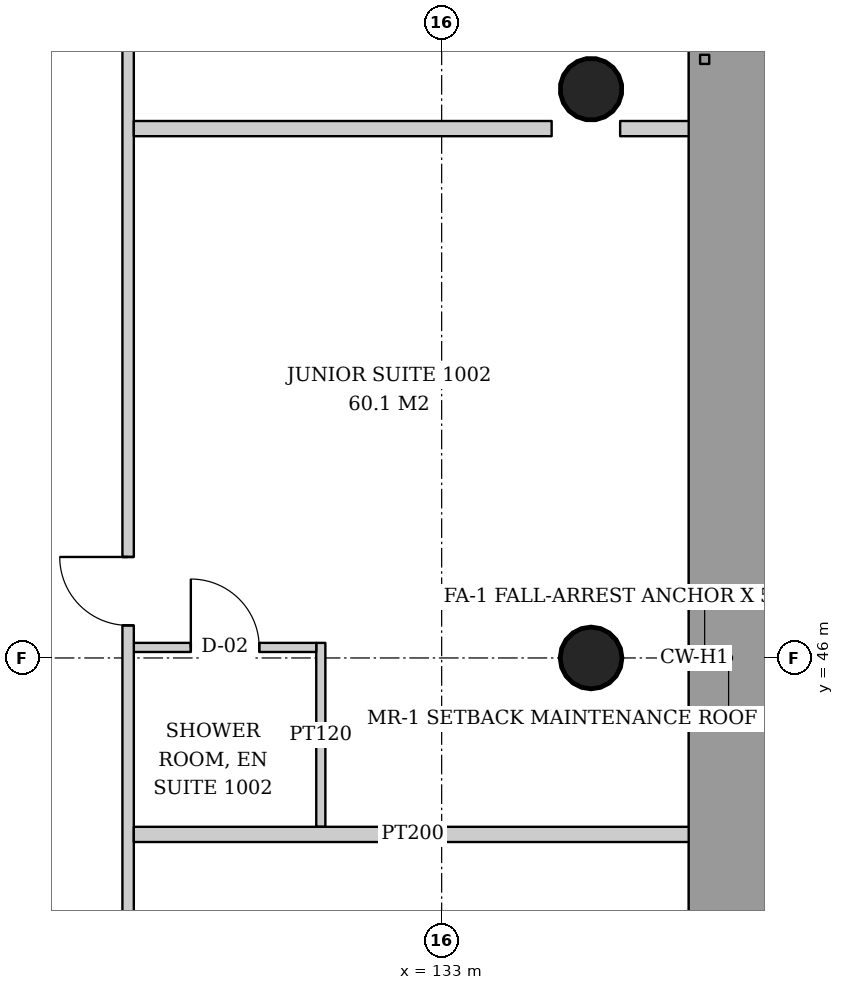
"""IFC4 building model, lengths in metres.
Left out: names, types, materials, properties, quantities, classifications, styles, units other than length and angle.
Written with IfcOpenShell. Run it as: python <this file> out.ifc"""

import sys

from ifc_helpers import new_model, si_unit, direction, frame, frame_2d, origin, origin_2d, place, context, subcontext, project, spatial, rectangle, hollow_circle, extrude, element, fill, save


model = new_model("IFC4")
c1 = context("Model", 3, precision=1e-05, world=origin(), true_north=direction((0.0, 1.0)))
c2 = subcontext(c1, "Body", "Model", "MODEL_VIEW")
j1 = project(units=[si_unit("LENGTHUNIT", "METRE"), si_unit("PLANEANGLEUNIT", "RADIAN")], contexts=[c1])
p1 = place(None, origin())
s1 = spatial("IfcSite", under=j1, at=p1, CompositionType="ELEMENT")
p2 = place(p1, origin())
s2 = spatial("IfcBuilding", under=s1, at=p2, CompositionType="ELEMENT")
p3 = place(p2, frame((0.0, 0.0, 43.8)))
s3 = spatial("IfcBuildingStorey", under=s2, at=p3, CompositionType="ELEMENT", Elevation=43.8)
p4 = place(p3, frame((135.017, 46.0, 0.0), z_axis=(-0.043069538298, 0.0, 0.999072076915), x_axis=(0.0, -1.0, 0.0)))
e1 = element("IfcColumn", 1, at=p4, inside=s3, PredefinedType="COLUMN", context=c2, shape_type="SweptSolid", body=[
    extrude(hollow_circle(Radius=0.406, WallThickness=0.03, at=origin_2d()), origin(), (0.0, 0.0, 1.0), 3.803),
])
p5 = place(p3, frame((135.017, 53.509, 0.0), z_axis=(-0.043059584825, -0.021497706284, 0.998841188968), x_axis=(0.446680166538, -0.894693706707, 0.0)))
e2 = element("IfcColumn", 2, at=p5, inside=s3, PredefinedType="COLUMN", context=c2, shape_type="SweptSolid", body=[
    extrude(hollow_circle(Radius=0.406, WallThickness=0.03, at=origin_2d()), origin(), (0.0, 0.0, 1.0), 3.804),
])
p6 = place(p3, frame((131.41, 43.779, 0.0), z_axis=(0.0, 0.0, 1.0), x_axis=(0.0, 1.0, 0.0)))
e3 = element("IfcWall", 3, at=p6, inside=s3, PredefinedType="PARTITIONING", context=c2, shape_type="SweptSolid", body=[
    extrude(rectangle(XDim=2.42, YDim=0.12, at=frame_2d((1.21, 0.0))), origin(), (0.0, 0.0, 1.0), 2.847),
])
p7 = place(p3, frame((128.95, 46.139, 0.0), z_axis=(0.0, 0.0, 1.0), x_axis=(1.0, 0.0, 0.0)))
e4 = element("IfcWall", 4, at=p7, inside=s3, PredefinedType="PARTITIONING", context=c2, shape_type="SweptSolid", body=[
    extrude(rectangle(XDim=2.4, YDim=0.12, at=frame_2d((1.2, 0.0))), origin(), (0.0, 0.0, 1.0), 3.6),
])
p8 = place(p7, frame((0.75, 0.0, 0.0)))
e5 = element("IfcOpeningElement", 5, at=p8, cuts=e4, PredefinedType="OPENING", context=c2, shape_type="SweptSolid", body=[
    extrude(rectangle(XDim=0.9, YDim=2.1, at=frame_2d((0.45, 1.05))), frame((0.0, 0.07, 0.0), z_axis=(0.0, -1.0, 0.0), x_axis=(1.0, 0.0, 0.0)), (0.0, 0.0, 1.0), 0.14),
])
p9 = place(p3, frame((128.875, 34.05, 0.0), z_axis=(0.0, 0.0, 1.0), x_axis=(0.0, 1.0, 0.0)))
e6 = element("IfcWall", 6, at=p9, inside=s3, PredefinedType="PARTITIONING", context=c2, shape_type="SweptSolid", body=[
    extrude(rectangle(XDim=23.75, YDim=0.15, at=frame_2d((11.875, 0.0))), origin(), (0.0, 0.0, 1.0), 2.8),
])
p10 = place(p9, frame((2.068, 0.0, 0.0)))
e7 = element("IfcOpeningElement", 7, at=p10, cuts=e6, PredefinedType="OPENING", context=c2, shape_type="SweptSolid", body=[
    extrude(rectangle(XDim=0.9, YDim=2.1, at=frame_2d((0.45, 1.05))), frame((0.0, 0.085, 0.0), z_axis=(0.0, -1.0, 0.0), x_axis=(1.0, 0.0, 0.0)), (0.0, 0.0, 1.0), 0.17),
])
p11 = place(p9, frame((12.379, 0.0, 0.0)))
e8 = element("IfcOpeningElement", 8, at=p11, cuts=e6, PredefinedType="OPENING", context=c2, shape_type="SweptSolid", body=[
    extrude(rectangle(XDim=0.9, YDim=2.1, at=frame_2d((0.45, 1.05))), frame((0.0, 0.085, 0.0), z_axis=(0.0, -1.0, 0.0), x_axis=(1.0, 0.0, 0.0)), (0.0, 0.0, 1.0), 0.17),
])
p12 = place(p3, frame((128.95, 43.678, 0.0), z_axis=(0.0, 0.0, 1.0), x_axis=(1.0, 0.0, 0.0)))
e9 = element("IfcWall", 9, at=p12, inside=s3, PredefinedType="PARTITIONING", context=c2, shape_type="SweptSolid", body=[
    extrude(rectangle(XDim=7.34, YDim=0.2, at=frame_2d((3.67, 0.0))), origin(), (0.0, 0.0, 1.0), 3.05),
])
p13 = place(p3, frame((128.95, 52.964, 0.0), z_axis=(0.0, 0.0, 1.0), x_axis=(1.0, 0.0, 0.0)))
e10 = element("IfcWall", 10, at=p13, inside=s3, PredefinedType="PARTITIONING", context=c2, shape_type="SweptSolid", body=[
    extrude(rectangle(XDim=5.497, YDim=0.2, at=frame_2d((2.749, 0.0))), origin(), (0.0, 0.0, 1.0), 3.6),
])
p14 = place(p3, frame((135.348, 52.964, 0.0), z_axis=(0.0, 0.0, 1.0), x_axis=(1.0, 0.0, 0.0)))
e11 = element("IfcWall", 11, at=p14, inside=s3, PredefinedType="PARTITIONING", context=c2, shape_type="SweptSolid", body=[
    extrude(rectangle(XDim=0.942, YDim=0.2, at=frame_2d((0.471, 0.0))), origin(), (0.0, 0.0, 1.0), 3.6),
])
p15 = place(p8, origin())
e12 = element("IfcDoor", 12, at=p15, inside=s3, OperationType="SINGLE_SWING_LEFT", PredefinedType="DOOR", context=c2, shape_type="SweptSolid", body=[
    extrude(rectangle(XDim=0.9, YDim=2.1, at=frame_2d((0.45, 1.05))), frame((0.0, 0.025, 0.0), z_axis=(0.0, -1.0, 0.0), x_axis=(1.0, 0.0, 0.0)), (0.0, 0.0, 1.0), 0.05),
])
fill(e5, e12)
p16 = place(p11, origin())
e13 = element("IfcDoor", 13, at=p16, inside=s3, OperationType="SINGLE_SWING_RIGHT", PredefinedType="DOOR", context=c2, shape_type="SweptSolid", body=[
    extrude(rectangle(XDim=0.9, YDim=2.1, at=frame_2d((0.45, 1.05))), frame((0.0, 0.025, 0.0), z_axis=(0.0, -1.0, 0.0), x_axis=(1.0, 0.0, 0.0)), (0.0, 0.0, 1.0), 0.05),
])
fill(e8, e13)
save(model, sys.argv[1])
